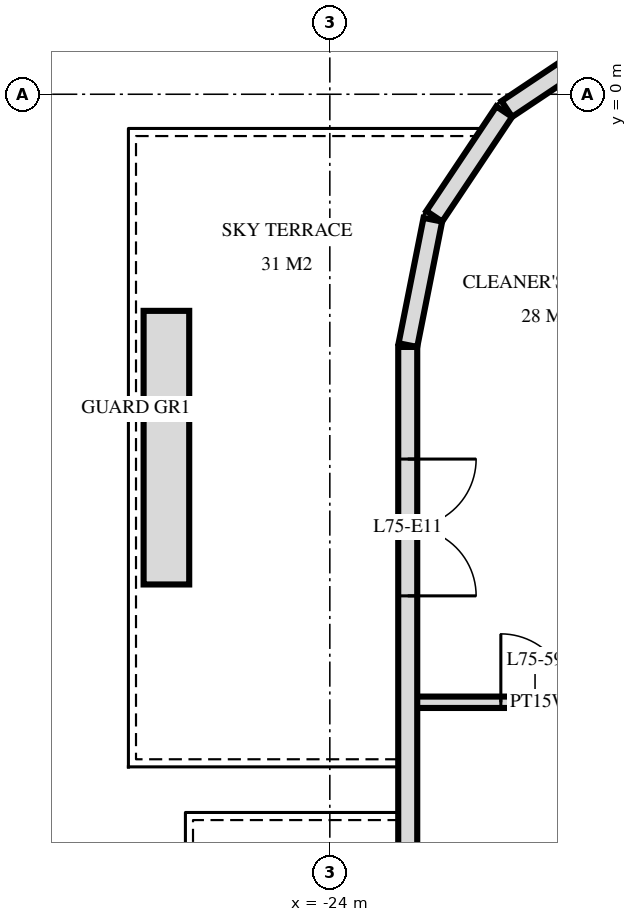
"""IFC4 building model, lengths in metres.
Left out: names, types, materials, properties, quantities, classifications, styles, units other than length and angle.
Written with IfcOpenShell. Run it as: python <this file> out.ifc"""

import sys

from ifc_helpers import new_model, si_unit, direction, frame, frame_2d, origin, place, context, subcontext, project, spatial, rectangle, extrude, element, fill, save


model = new_model("IFC4")
c1 = context("Model", 3, precision=1e-05, world=origin(), true_north=direction((0.0, 1.0)))
c2 = subcontext(c1, "Body", "Model", "MODEL_VIEW")
j1 = project(units=[si_unit("LENGTHUNIT", "METRE"), si_unit("PLANEANGLEUNIT", "RADIAN")], contexts=[c1])
p1 = place(None, origin())
s1 = spatial("IfcSite", under=j1, at=p1, CompositionType="ELEMENT")
p2 = place(p1, origin())
s2 = spatial("IfcBuilding", under=s1, at=p2, CompositionType="ELEMENT")
p3 = place(p2, frame((0.0, 0.0, 284.1)))
s3 = spatial("IfcBuildingStorey", under=s2, at=p3, CompositionType="ELEMENT", Elevation=284.1)
for number, where, z_axis, x_axis in (
    (1, (-20.294, 0.726, 0.0), (0.0, 0.0, 1.0), (-0.831, -0.556, 0.0)),
    (2, (-21.706, -0.229, 0.0), (0.0, 0.0, 1.0), (-0.556, -0.831, 0.0)),
):
    element("IfcWall", number, at=place(p3, frame(where, z_axis=z_axis, x_axis=x_axis)), inside=s3, PredefinedType="SOLIDWALL", context=c2, shape_type="SweptSolid", body=[
        extrude(rectangle(XDim=1.656, YDim=0.25, at=frame_2d((0.828, 0.0))), origin(), (0.0, 0.0, 1.0), 3.22),
    ])
p4 = place(p3, frame((-22.645, -1.651, 0.0), z_axis=(0.0, 0.0, 1.0), x_axis=(-0.19513878023, -0.980775640221, 0.0)))
e3 = element("IfcWall", 3, at=p4, inside=s3, PredefinedType="SOLIDWALL", context=c2, shape_type="SweptSolid", body=[
    extrude(rectangle(XDim=1.681, YDim=0.25, at=frame_2d((0.841, 0.0))), origin(), (0.0, 0.0, 1.0), 3.22),
])
p5 = place(p3, frame((-22.975, -3.325, 0.0), z_axis=(0.0, 0.0, 1.0), x_axis=(0.0, -1.0, 0.0)))
e4 = element("IfcWall", 4, at=p5, inside=s3, PredefinedType="SOLIDWALL", context=c2, shape_type="SweptSolid", body=[
    extrude(rectangle(XDim=25.951, YDim=0.25, at=frame_2d((12.975, 0.0))), origin(), (0.0, 0.0, 1.0), 3.22),
])
p6 = place(p5, frame((1.475, 0.0, 0.0)))
e5 = element("IfcOpeningElement", 5, at=p6, cuts=e4, PredefinedType="OPENING", context=c2, shape_type="SweptSolid", body=[
    extrude(rectangle(XDim=1.8, YDim=2.4, at=frame_2d((0.9, 1.2))), frame((0.0, 0.135, 0.0), z_axis=(0.0, -1.0, 0.0), x_axis=(1.0, 0.0, 0.0)), (0.0, 0.0, 1.0), 0.27),
])
p7 = place(p5, frame((7.975, 0.0, 0.0)))
e6 = element("IfcOpeningElement", 6, at=p7, cuts=e4, PredefinedType="OPENING", context=c2, shape_type="SweptSolid", body=[
    extrude(rectangle(XDim=1.8, YDim=2.4, at=frame_2d((0.9, 1.2))), frame((0.0, 0.135, 0.0), z_axis=(0.0, -1.0, 0.0), x_axis=(1.0, 0.0, 0.0)), (0.0, 0.0, 1.0), 0.27),
])
p8 = place(p5, frame((18.175, 0.0, 0.0)))
e7 = element("IfcOpeningElement", 7, at=p8, cuts=e4, PredefinedType="OPENING", context=c2, shape_type="SweptSolid", body=[
    extrude(rectangle(XDim=1.8, YDim=2.4, at=frame_2d((0.9, 1.2))), frame((0.0, 0.135, 0.0), z_axis=(0.0, -1.0, 0.0), x_axis=(1.0, 0.0, 0.0)), (0.0, 0.0, 1.0), 0.27),
])
p9 = place(p5, frame((21.075, 0.0, 0.0)))
e8 = element("IfcOpeningElement", 8, at=p9, cuts=e4, PredefinedType="OPENING", context=c2, shape_type="SweptSolid", body=[
    extrude(rectangle(XDim=1.8, YDim=2.4, at=frame_2d((0.9, 1.2))), frame((0.0, 0.135, 0.0), z_axis=(0.0, -1.0, 0.0), x_axis=(1.0, 0.0, 0.0)), (0.0, 0.0, 1.0), 0.27),
])
p10 = place(p5, frame((23.825, 0.0, 0.9)))
e9 = element("IfcOpeningElement", 9, at=p10, cuts=e4, PredefinedType="OPENING", context=c2, shape_type="SweptSolid", body=[
    extrude(rectangle(XDim=1.8, YDim=1.5, at=frame_2d((0.9, 0.75))), frame((0.0, 0.135, 0.0), z_axis=(0.0, -1.0, 0.0), x_axis=(1.0, 0.0, 0.0)), (0.0, 0.0, 1.0), 0.27),
])
p11 = place(p3, frame((-26.15, -6.45, 0.0), z_axis=(0.0, 0.0, 1.0), x_axis=(0.0, 1.0, 0.0)))
e10 = element("IfcWall", 10, at=p11, inside=s3, PredefinedType="USERDEFINED", context=c2, shape_type="SweptSolid", body=[
    extrude(rectangle(XDim=3.6, YDim=0.6, at=frame_2d((1.8, 0.0))), origin(), (0.0, 0.0, 1.0), 0.65),
])
p12 = place(p3, frame((-22.92, -8.0, 0.0), z_axis=(0.0, 0.0, 1.0), x_axis=(1.0, 0.0, 0.0)))
e11 = element("IfcWall", 11, at=p12, inside=s3, PredefinedType="PLUMBINGWALL", context=c2, shape_type="SweptSolid", body=[
    extrude(rectangle(XDim=3.37, YDim=0.15, at=frame_2d((1.685, 0.0))), origin(), (0.0, 0.0, 1.0), 3.22),
])
p13 = place(p12, frame((1.17, 0.0, 0.0)))
e12 = element("IfcOpeningElement", 12, at=p13, cuts=e11, PredefinedType="OPENING", context=c2, shape_type="SweptSolid", body=[
    extrude(rectangle(XDim=0.9, YDim=2.1, at=frame_2d((0.45, 1.05))), frame((0.0, 0.085, 0.0), z_axis=(0.0, -1.0, 0.0), x_axis=(1.0, 0.0, 0.0)), (0.0, 0.0, 1.0), 0.17),
])
p14 = place(p6, origin())
e13 = element("IfcDoor", 13, at=p14, inside=s3, OperationType="DOUBLE_DOOR_SINGLE_SWING", PredefinedType="DOOR", context=c2, shape_type="SweptSolid", body=[
    extrude(rectangle(XDim=1.8, YDim=2.4, at=frame_2d((0.9, 1.2))), frame((0.0, 0.025, 0.0), z_axis=(0.0, -1.0, 0.0), x_axis=(1.0, 0.0, 0.0)), (0.0, 0.0, 1.0), 0.05),
])
fill(e5, e13)
p15 = place(p13, origin())
e14 = element("IfcDoor", 14, at=p15, inside=s3, OperationType="SINGLE_SWING_RIGHT", PredefinedType="DOOR", context=c2, shape_type="SweptSolid", body=[
    extrude(rectangle(XDim=0.9, YDim=2.1, at=frame_2d((0.45, 1.05))), frame((0.0, 0.025, 0.0), z_axis=(0.0, -1.0, 0.0), x_axis=(1.0, 0.0, 0.0)), (0.0, 0.0, 1.0), 0.05),
])
fill(e12, e14)
save(model, sys.argv[1])
